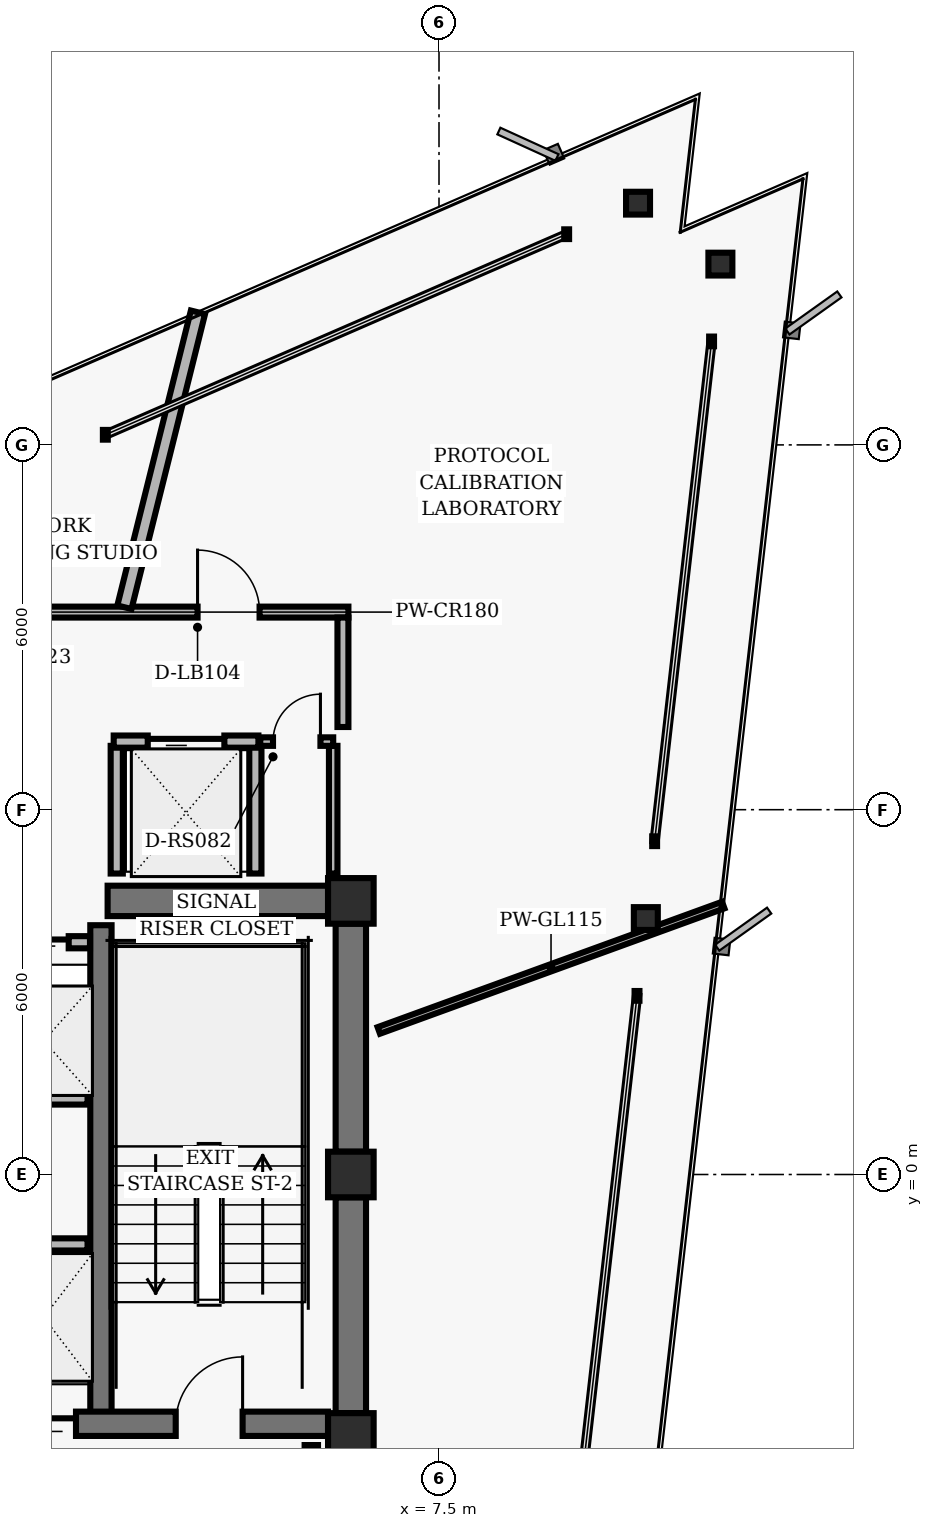
"""IFC4 building model, lengths in metres.
Left out: names, types, materials, properties, quantities, classifications, styles, units other than length and angle.
Written with IfcOpenShell. Run it as: python <this file> out.ifc"""

import sys

from ifc_helpers import new_model, si_unit, direction, frame, frame_2d, origin, origin_2d, place, context, subcontext, project, spatial, rectangle, hollow_rectangle, i_section, extrude, element, fill, save


model = new_model("IFC4")
c1 = context("Model", 3, precision=1e-05, world=origin(), true_north=direction((0.0, 1.0)))
c2 = subcontext(c1, "Body", "Model", "MODEL_VIEW")
j1 = project(units=[si_unit("LENGTHUNIT", "METRE"), si_unit("PLANEANGLEUNIT", "RADIAN")], contexts=[c1])
p1 = place(None, origin())
s1 = spatial("IfcSite", under=j1, at=p1, CompositionType="ELEMENT")
p2 = place(p1, origin())
s2 = spatial("IfcBuilding", under=s1, at=p2, CompositionType="ELEMENT")
p3 = place(p2, frame((0.0, 0.0, 220.96)))
s3 = spatial("IfcBuildingStorey", under=s2, at=p3, CompositionType="ELEMENT", Elevation=220.96)
for number, where, z_axis, x_axis in (
    (1, (6.05, 4.5, 0.0), (0.0, 0.0, 1.0), (1.0, 0.0, 0.0)),
    (2, (6.05, 0.0, 0.0), (0.0, 0.0, 1.0), (1.0, 0.0, 0.0)),
    (3, (6.05, -4.3, 0.0), (0.0, 0.0, 1.0), (1.0, 0.0, 0.0)),
):
    element("IfcColumn", number, at=place(p3, frame(where, z_axis=z_axis, x_axis=x_axis)), inside=s3, PredefinedType="COLUMN", context=c2, shape_type="SweptSolid", body=[
        extrude(hollow_rectangle(XDim=0.75, YDim=0.75, WallThickness=0.05, InnerFilletRadius=0.02, OuterFilletRadius=0.04, at=origin_2d()), origin(), (0.0, 0.0, 1.0), 3.04),
    ])
p4 = place(p3, frame((6.05, 0.375, 0.0), z_axis=(0.0, 0.0, 1.0), x_axis=(0.0, 1.0, 0.0)))
e4 = element("IfcWall", 4, at=p4, inside=s3, PredefinedType="SHEAR", context=c2, shape_type="SweptSolid", body=[
    extrude(rectangle(XDim=3.75, YDim=0.5, at=frame_2d((1.875, 0.0))), origin(), (0.0, 0.0, 1.0), 2.798),
])
p5 = place(p3, frame((6.05, -3.925, 0.0), z_axis=(0.0, 0.0, 1.0), x_axis=(0.0, 1.0, 0.0)))
e5 = element("IfcWall", 5, at=p5, inside=s3, PredefinedType="SHEAR", context=c2, shape_type="SweptSolid", body=[
    extrude(rectangle(XDim=3.55, YDim=0.5, at=frame_2d((1.775, 0.0))), origin(), (0.0, 0.0, 1.0), 2.798),
])
p6 = place(p3, frame((1.94, -4.1, 0.0), z_axis=(0.0, 0.0, 1.0), x_axis=(0.0, 1.0, 0.0)))
e6 = element("IfcWall", 6, at=p6, inside=s3, PredefinedType="SHEAR", context=c2, shape_type="SweptSolid", body=[
    extrude(rectangle(XDim=8.2, YDim=0.35, at=frame_2d((4.1, 0.0))), origin(), (0.0, 0.0, 1.0), 2.798),
])
p7 = place(p3, frame((-5.675, -4.1, 0.0), z_axis=(0.0, 0.0, 1.0), x_axis=(1.0, 0.0, 0.0)))
e7 = element("IfcWall", 7, at=p7, inside=s3, PredefinedType="SHEAR", context=c2, shape_type="SweptSolid", body=[
    extrude(rectangle(XDim=11.35, YDim=0.4, at=frame_2d((5.675, 0.0))), origin(), (0.0, 0.0, 1.0), 2.798),
])
p8 = place(p7, frame((1.405, 0.0, 0.0)))
e8 = element("IfcOpeningElement", 8, at=p8, cuts=e7, PredefinedType="OPENING", context=c2, shape_type="SweptSolid", body=[
    extrude(rectangle(XDim=1.1, YDim=2.04, at=frame_2d((0.55, 1.02))), frame((0.0, 0.21, 0.0), z_axis=(0.0, -1.0, 0.0), x_axis=(1.0, 0.0, 0.0)), (0.0, 0.0, 1.0), 0.42),
])
p9 = place(p7, frame((8.845, 0.0, 0.0)))
e9 = element("IfcOpeningElement", 9, at=p9, cuts=e7, PredefinedType="OPENING", context=c2, shape_type="SweptSolid", body=[
    extrude(rectangle(XDim=1.1, YDim=2.04, at=frame_2d((0.55, 1.02))), frame((0.0, 0.21, 0.0), z_axis=(0.0, -1.0, 0.0), x_axis=(1.0, 0.0, 0.0)), (0.0, 0.0, 1.0), 0.42),
])
p10 = place(p7, frame((4.145, 0.0, 0.0)))
e10 = element("IfcOpeningElement", 10, at=p10, cuts=e7, PredefinedType="OPENING", context=c2, shape_type="SweptSolid", body=[
    extrude(rectangle(XDim=1.06, YDim=2.04, at=frame_2d((0.53, 1.02))), frame((0.0, 0.21, 0.0), z_axis=(0.0, -1.0, 0.0), x_axis=(1.0, 0.0, 0.0)), (0.0, 0.0, 1.0), 0.42),
])
p11 = place(p7, frame((6.145, 0.0, 0.0)))
e11 = element("IfcOpeningElement", 11, at=p11, cuts=e7, PredefinedType="OPENING", context=c2, shape_type="SweptSolid", body=[
    extrude(rectangle(XDim=1.06, YDim=2.04, at=frame_2d((0.53, 1.02))), frame((0.0, 0.21, 0.0), z_axis=(0.0, -1.0, 0.0), x_axis=(1.0, 0.0, 0.0)), (0.0, 0.0, 1.0), 0.42),
])
p12 = place(p3, frame((2.05, 4.5, 0.0), z_axis=(0.0, 0.0, 1.0), x_axis=(1.0, 0.0, 0.0)))
e12 = element("IfcWall", 12, at=p12, inside=s3, PredefinedType="SHEAR", context=c2, shape_type="SweptSolid", body=[
    extrude(rectangle(XDim=3.625, YDim=0.5, at=frame_2d((1.812, 0.0))), origin(), (0.0, 0.0, 1.0), 2.798),
])
for number, where, z_axis, x_axis in (
    (13, (10.901, 4.21, 0.0), (0.0, 0.0, 1.0), (1.0, 0.0, 0.0)),
    (14, (12.128, 14.973, 0.0), (0.0, 0.0, 1.0), (1.0, 0.0, 0.0)),
    (15, (10.773, 15.976, 0.0), (0.0, 0.0, 1.0), (1.0, 0.0, 0.0)),
):
    element("IfcColumn", number, at=place(p3, frame(where, z_axis=z_axis, x_axis=x_axis)), inside=s3, PredefinedType="COLUMN", context=c2, shape_type="SweptSolid", body=[
        extrude(i_section(OverallWidth=0.394, OverallDepth=0.375, WebThickness=0.017, FlangeThickness=0.028, FilletRadius=0.016, at=origin_2d()), origin(), (0.0, 0.0, 1.0), 3.04),
    ])
p13 = place(p3, frame((-1.72, -1.15, 0.0), z_axis=(0.0, 0.0, 1.0), x_axis=(1.0, 0.0, 0.0)))
e16 = element("IfcWall", 16, at=p13, inside=s3, PredefinedType="PARTITIONING", context=c2, shape_type="SweptSolid", body=[
    extrude(rectangle(XDim=3.44, YDim=0.2, at=frame_2d((1.72, 0.0))), origin(), (0.0, 0.0, 1.0), 2.773),
])
p14 = place(p3, frame((5.4, -7.16, 0.0), z_axis=(0.0, 0.0, 1.0), x_axis=(0.0, 1.0, 0.0)))
e17 = element("IfcWall", 17, at=p14, inside=s3, PredefinedType="PARTITIONING", context=c2, shape_type="SweptSolid", body=[
    extrude(rectangle(XDim=2.71, YDim=0.22, at=frame_2d((1.355, 0.0))), origin(), (0.0, 0.0, 1.0), 2.773),
])
p15 = place(p3, frame((-1.72, 1.25, 0.0), z_axis=(0.0, 0.0, 1.0), x_axis=(1.0, 0.0, 0.0)))
e18 = element("IfcWall", 18, at=p15, inside=s3, PredefinedType="PARTITIONING", context=c2, shape_type="SweptSolid", body=[
    extrude(rectangle(XDim=3.44, YDim=0.2, at=frame_2d((1.72, 0.0))), origin(), (0.0, 0.0, 1.0), 2.773),
])
p16 = place(p3, frame((-1.76, 3.82, 0.0), z_axis=(0.0, 0.0, 1.0), x_axis=(1.0, 0.0, 0.0)))
e19 = element("IfcWall", 19, at=p16, inside=s3, PredefinedType="PARTITIONING", context=c2, shape_type="SweptSolid", body=[
    extrude(rectangle(XDim=3.52, YDim=0.2, at=frame_2d((1.76, 0.0))), origin(), (0.0, 0.0, 1.0), 2.773),
])
p17 = place(p16, frame((0.35, 0.0, 0.0)))
e20 = element("IfcOpeningElement", 20, at=p17, cuts=e19, PredefinedType="OPENING", context=c2, shape_type="SweptSolid", body=[
    extrude(rectangle(XDim=1.06, YDim=2.04, at=frame_2d((0.53, 1.02))), frame((0.0, 0.11, 0.0), z_axis=(0.0, -1.0, 0.0), x_axis=(1.0, 0.0, 0.0)), (0.0, 0.0, 1.0), 0.22),
])
p18 = place(p16, frame((2.11, 0.0, 0.0)))
e21 = element("IfcOpeningElement", 21, at=p18, cuts=e19, PredefinedType="OPENING", context=c2, shape_type="SweptSolid", body=[
    extrude(rectangle(XDim=1.06, YDim=2.04, at=frame_2d((0.53, 1.02))), frame((0.0, 0.11, 0.0), z_axis=(0.0, -1.0, 0.0), x_axis=(1.0, 0.0, 0.0)), (0.0, 0.0, 1.0), 0.22),
])
for number, where, z_axis, x_axis in (
    (22, (2.2, 4.95, 0.0), (0.0, 0.0, 1.0), (0.0, 1.0, 0.0)),
    (23, (4.48, 4.95, 0.0), (0.0, 0.0, 1.0), (0.0, 1.0, 0.0)),
):
    element("IfcWall", number, at=place(p3, frame(where, z_axis=z_axis, x_axis=x_axis)), inside=s3, PredefinedType="PARTITIONING", context=c2, shape_type="SweptSolid", body=[
        extrude(rectangle(XDim=2.1, YDim=0.2, at=frame_2d((1.05, 0.0))), origin(), (0.0, 0.0, 1.0), 2.773),
    ])
p19 = place(p3, frame((2.15, 7.12, 0.0), z_axis=(0.0, 0.0, 1.0), x_axis=(1.0, 0.0, 0.0)))
e24 = element("IfcWall", 24, at=p19, inside=s3, PredefinedType="PARTITIONING", context=c2, shape_type="SweptSolid", body=[
    extrude(rectangle(XDim=2.38, YDim=0.2, at=frame_2d((1.19, 0.0))), origin(), (0.0, 0.0, 1.0), 2.395),
])
p20 = place(p19, frame((0.56, 0.0, 0.0)))
e25 = element("IfcOpeningElement", 25, at=p20, cuts=e24, PredefinedType="OPENING", context=c2, shape_type="SweptSolid", body=[
    extrude(rectangle(XDim=1.26, YDim=2.06, at=frame_2d((0.63, 1.03))), frame((0.0, 0.11, 0.0), z_axis=(0.0, -1.0, 0.0), x_axis=(1.0, 0.0, 0.0)), (0.0, 0.0, 1.0), 0.22),
])
p21 = place(p3, frame((5.76, 4.95, 0.0), z_axis=(0.0, 0.0, 1.0), x_axis=(0.0, 1.0, 0.0)))
e26 = element("IfcWall", 26, at=p21, inside=s3, PredefinedType="PARTITIONING", context=c2, shape_type="SweptSolid", body=[
    extrude(rectangle(XDim=2.1, YDim=0.14, at=frame_2d((1.05, 0.0))), origin(), (0.0, 0.0, 1.0), 2.773),
])
p22 = place(p3, frame((4.56, 7.12, 0.0), z_axis=(0.0, 0.0, 1.0), x_axis=(1.0, 0.0, 0.0)))
e27 = element("IfcWall", 27, at=p22, inside=s3, PredefinedType="PARTITIONING", context=c2, shape_type="SweptSolid", body=[
    extrude(rectangle(XDim=1.2, YDim=0.14, at=frame_2d((0.6, 0.0))), origin(), (0.0, 0.0, 1.0), 2.773),
])
p23 = place(p22, frame((0.21, 0.0, 0.0)))
e28 = element("IfcOpeningElement", 28, at=p23, cuts=e27, PredefinedType="OPENING", context=c2, shape_type="SweptSolid", body=[
    extrude(rectangle(XDim=0.78, YDim=2.01, at=frame_2d((0.39, 1.005))), frame((0.0, 0.08, 0.0), z_axis=(0.0, -1.0, 0.0), x_axis=(1.0, 0.0, 0.0)), (0.0, 0.0, 1.0), 0.16),
])
p24 = place(p3, frame((-7.29, 9.25, 0.0), z_axis=(0.0, 0.0, 1.0), x_axis=(1.0, 0.0, 0.0)))
e29 = element("IfcWall", 29, at=p24, inside=s3, PredefinedType="PARTITIONING", context=c2, shape_type="SweptSolid", body=[
    extrude(rectangle(XDim=13.3, YDim=0.18, at=frame_2d((6.65, 0.0))), origin(), (0.0, 0.0, 1.0), 2.395),
])
p25 = place(p24, frame((10.819, 0.0, 0.0)))
e30 = element("IfcOpeningElement", 30, at=p25, cuts=e29, PredefinedType="OPENING", context=c2, shape_type="SweptSolid", body=[
    extrude(rectangle(XDim=1.02, YDim=2.02, at=frame_2d((0.51, 1.01))), frame((0.0, 0.1, 0.0), z_axis=(0.0, -1.0, 0.0), x_axis=(1.0, 0.0, 0.0)), (0.0, 0.0, 1.0), 0.2),
])
p26 = place(p24, frame((4.575, 0.0, 0.0)))
e31 = element("IfcOpeningElement", 31, at=p26, cuts=e29, PredefinedType="OPENING", context=c2, shape_type="SweptSolid", body=[
    extrude(rectangle(XDim=0.96, YDim=2.02, at=frame_2d((0.48, 1.01))), frame((0.0, 0.1, 0.0), z_axis=(0.0, -1.0, 0.0), x_axis=(1.0, 0.0, 0.0)), (0.0, 0.0, 1.0), 0.2),
])
p27 = place(p3, frame((5.92, 9.16, 0.0), z_axis=(0.0, 0.0, 1.0), x_axis=(0.0, -1.0, 0.0)))
e32 = element("IfcWall", 32, at=p27, inside=s3, PredefinedType="PARTITIONING", context=c2, shape_type="SweptSolid", body=[
    extrude(rectangle(XDim=1.8, YDim=0.18, at=frame_2d((0.9, 0.0))), origin(), (0.0, 0.0, 1.0), 2.773),
])
p28 = place(p3, frame((6.51, 2.369, 0.0), z_axis=(0.0, 0.0, 1.0), x_axis=(0.939690503952, 0.342025959222, 0.0)))
e33 = element("IfcWall", 33, at=p28, inside=s3, PredefinedType="MOVABLE", context=c2, shape_type="SweptSolid", body=[
    extrude(rectangle(XDim=6.028, YDim=0.115, at=frame_2d((3.014, 0.0))), origin(), (0.0, 0.0, 1.0), 2.773),
])
p29 = place(p3, frame((2.326, 9.33, 0.0), z_axis=(0.0, 0.0, 1.0), x_axis=(0.24192658113, 0.97029455803, 0.0)))
e34 = element("IfcWall", 34, at=p29, inside=s3, PredefinedType="PARTITIONING", context=c2, shape_type="SweptSolid", body=[
    extrude(rectangle(XDim=4.999, YDim=0.24, at=frame_2d((2.5, 0.0))), origin(), (0.0, 0.0, 1.0), 2.773),
])
p30 = place(p9, origin())
e35 = element("IfcDoor", 35, at=p30, inside=s3, OperationType="SINGLE_SWING_RIGHT", PredefinedType="DOOR", context=c2, shape_type="SweptSolid", body=[
    extrude(rectangle(XDim=1.1, YDim=2.04, at=frame_2d((0.55, 1.02))), frame((0.0, 0.025, 0.0), z_axis=(0.0, -1.0, 0.0), x_axis=(1.0, 0.0, 0.0)), (0.0, 0.0, 1.0), 0.05),
])
fill(e9, e35)
p31 = place(p11, origin())
e36 = element("IfcDoor", 36, at=p31, inside=s3, OperationType="SLIDING_TO_RIGHT", PredefinedType="DOOR", context=c2, shape_type="SweptSolid", body=[
    extrude(rectangle(XDim=1.06, YDim=2.04, at=frame_2d((0.53, 1.02))), frame((0.0, 0.025, 0.0), z_axis=(0.0, -1.0, 0.0), x_axis=(1.0, 0.0, 0.0)), (0.0, 0.0, 1.0), 0.05),
])
fill(e11, e36)
p32 = place(p18, origin())
e37 = element("IfcDoor", 37, at=p32, inside=s3, OperationType="SLIDING_TO_RIGHT", PredefinedType="DOOR", context=c2, shape_type="SweptSolid", body=[
    extrude(rectangle(XDim=1.06, YDim=2.04, at=frame_2d((0.53, 1.02))), frame((0.0, 0.025, 0.0), z_axis=(0.0, -1.0, 0.0), x_axis=(1.0, 0.0, 0.0)), (0.0, 0.0, 1.0), 0.05),
])
fill(e21, e37)
p33 = place(p20, origin())
e38 = element("IfcDoor", 38, at=p33, inside=s3, OperationType="SLIDING_TO_LEFT", PredefinedType="DOOR", context=c2, shape_type="SweptSolid", body=[
    extrude(rectangle(XDim=1.26, YDim=2.06, at=frame_2d((0.63, 1.03))), frame((0.0, 0.025, 0.0), z_axis=(0.0, -1.0, 0.0), x_axis=(1.0, 0.0, 0.0)), (0.0, 0.0, 1.0), 0.05),
])
fill(e25, e38)
p34 = place(p23, origin())
e39 = element("IfcDoor", 39, at=p34, inside=s3, OperationType="SINGLE_SWING_RIGHT", PredefinedType="DOOR", context=c2, shape_type="SweptSolid", body=[
    extrude(rectangle(XDim=0.78, YDim=2.01, at=frame_2d((0.39, 1.005))), frame((0.0, 0.025, 0.0), z_axis=(0.0, -1.0, 0.0), x_axis=(1.0, 0.0, 0.0)), (0.0, 0.0, 1.0), 0.05),
])
fill(e28, e39)
p35 = place(p25, origin())
e40 = element("IfcDoor", 40, at=p35, inside=s3, OperationType="SINGLE_SWING_LEFT", PredefinedType="DOOR", context=c2, shape_type="SweptSolid", body=[
    extrude(rectangle(XDim=1.02, YDim=2.02, at=frame_2d((0.51, 1.01))), frame((0.0, 0.025, 0.0), z_axis=(0.0, -1.0, 0.0), x_axis=(1.0, 0.0, 0.0)), (0.0, 0.0, 1.0), 0.05),
])
fill(e30, e40)
save(model, sys.argv[1])
